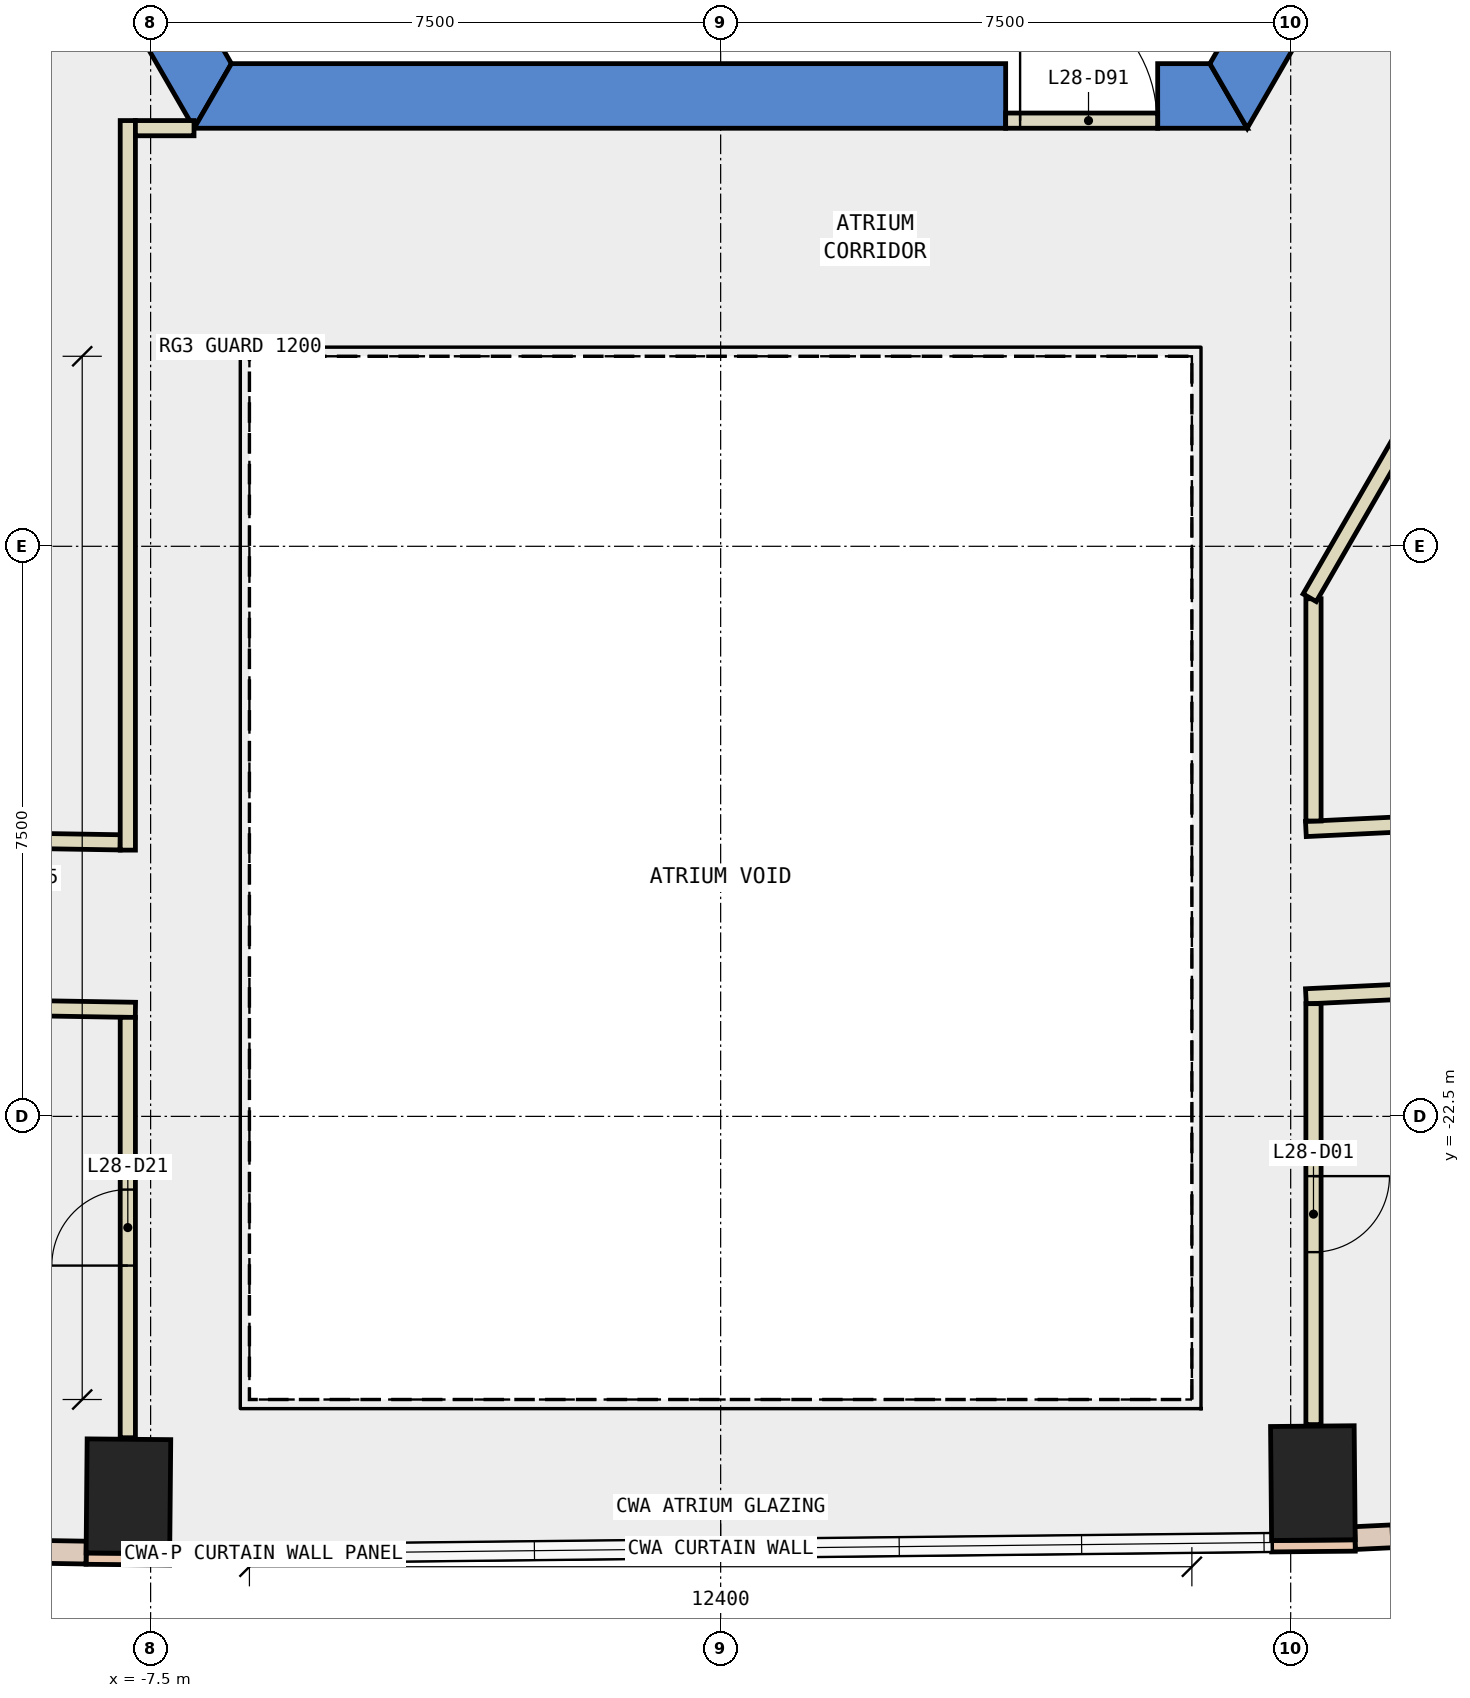
"""IFC4 building model, lengths in metres.
Left out: names, types, materials, properties, quantities, classifications, styles, units other than length and angle.
Written with IfcOpenShell. Run it as: python <this file> out.ifc"""

import sys

from ifc_helpers import new_model, si_unit, direction, frame, frame_2d, origin, origin_2d, place, context, subcontext, project, spatial, polyline, rectangle, outline, extrude, element, fill, save


model = new_model("IFC4")
c1 = context("Model", 3, precision=1e-05, world=origin(), true_north=direction((0.0, 1.0)))
c2 = subcontext(c1, "Body", "Model", "MODEL_VIEW")
j1 = project(units=[si_unit("LENGTHUNIT", "METRE"), si_unit("PLANEANGLEUNIT", "RADIAN")], contexts=[c1])
p1 = place(None, origin())
s1 = spatial("IfcSite", under=j1, at=p1, CompositionType="ELEMENT")
p2 = place(p1, origin())
s2 = spatial("IfcBuilding", under=s1, at=p2, CompositionType="ELEMENT")
p3 = place(p2, frame((0.0, 0.0, 128.6)))
s3 = spatial("IfcBuildingStorey", under=s2, at=p3, CompositionType="ELEMENT", Elevation=128.6)
for number, where, z_axis, x_axis in (
    (1, (-7.792, -27.498, -0.4), (0.0, 0.0, 1.0), (-1.0, 0.009, 0.0)),
    (2, (7.792, -27.325, -0.4), (0.0, 0.0, 1.0), (1.0, 0.009, 0.0)),
):
    element("IfcColumn", number, at=place(p3, frame(where, z_axis=z_axis, x_axis=x_axis)), inside=s3, PredefinedType="COLUMN", context=c2, shape_type="SweptSolid", body=[
        extrude(rectangle(XDim=1.1, YDim=1.5, at=origin_2d()), origin(), (0.0, 0.0, 1.0), 4.0),
    ])
p4 = place(p3, frame((0.0, 0.0, -0.4)))
e3 = element("IfcWall", 3, at=p4, inside=s3, PredefinedType="SHEAR", context=c2, shape_type="SweptSolid", body=[
    extrude(outline(polyline([(-13.856, 2.5), (-6.928, -9.5), (-6.437, -8.65), (-12.875, 2.5), (-13.856, 2.5)])), origin(), (0.0, 0.0, 1.0), 4.0),
])
p5 = place(p3, frame((0.0, 0.0, -0.4)))
e4 = element("IfcWall", 4, at=p5, inside=s3, PredefinedType="SHEAR", context=c2, shape_type="SweptSolid", body=[
    extrude(outline(polyline([(3.75, -9.5), (3.75, -8.65), (-6.437, -8.65), (-6.928, -9.5), (3.75, -9.5)])), origin(), (0.0, 0.0, 1.0), 4.0),
])
p6 = place(p3, frame((0.0, 0.0, -0.4)))
e5 = element("IfcWall", 5, at=p6, inside=s3, PredefinedType="SHEAR", context=c2, shape_type="SweptSolid", body=[
    extrude(outline(polyline([(5.75, -8.65), (5.75, -9.5), (6.928, -9.5), (6.437, -8.65), (5.75, -8.65)])), origin(), (0.0, 0.0, 1.0), 4.0),
])
p7 = place(p3, frame((0.0, 0.0, -0.4)))
e6 = element("IfcWall", 6, at=p7, inside=s3, PredefinedType="SHEAR", context=c2, shape_type="SweptSolid", body=[
    extrude(outline(polyline([(8.117, -7.44), (7.381, -7.015), (6.437, -8.65), (6.928, -9.5), (8.117, -7.44)])), origin(), (0.0, 0.0, 1.0), 4.0),
])
for number, where, z_axis, x_axis in (
    (7, (-8.349, -28.318, 0.0), (0.0, 0.0, 1.0), (1.0, -0.009, 0.0)),
    (8, (7.249, -28.155, 0.0), (0.0, 0.0, 1.0), (1.0, 0.009, 0.0)),
):
    element("IfcWall", number, at=place(p3, frame(where, z_axis=z_axis, x_axis=x_axis)), inside=s3, PredefinedType="STANDARD", context=c2, shape_type="SweptSolid", body=[
        extrude(rectangle(XDim=1.1, YDim=0.15, at=frame_2d((0.55, 0.0))), origin(), (0.0, 0.0, 1.0), 3.6),
    ])
p8 = place(p3, frame((-14.242, -28.141, 0.0), z_axis=(0.0, 0.0, 1.0), x_axis=(0.999862081538, -0.016607766328, 0.0)))
e9 = element("IfcWall", 9, at=p8, inside=s3, PredefinedType="STANDARD", context=c2, shape_type="SweptSolid", body=[
    extrude(rectangle(XDim=5.895, YDim=0.3, at=frame_2d((2.947, 0.0))), origin(), (0.0, 0.0, 1.0), 3.6),
])
p9 = place(p8, frame((0.474, 0.0, 0.9)))
e10 = element("IfcOpeningElement", 10, at=p9, cuts=e9, PredefinedType="OPENING", context=c2, shape_type="SweptSolid", body=[
    extrude(rectangle(XDim=2.0, YDim=2.6, at=frame_2d((1.0, 1.3))), frame((0.0, 0.16, 0.0), z_axis=(0.0, -1.0, 0.0), x_axis=(1.0, 0.0, 0.0)), (0.0, 0.0, 1.0), 0.32),
])
p10 = place(p8, frame((3.421, 0.0, 0.9)))
e11 = element("IfcOpeningElement", 11, at=p10, cuts=e9, PredefinedType="OPENING", context=c2, shape_type="SweptSolid", body=[
    extrude(rectangle(XDim=2.0, YDim=2.6, at=frame_2d((1.0, 1.3))), frame((0.0, 0.16, 0.0), z_axis=(0.0, -1.0, 0.0), x_axis=(1.0, 0.0, 0.0)), (0.0, 0.0, 1.0), 0.32),
])
p11 = place(p3, frame((8.347, -28.048, 0.0), z_axis=(0.0, 0.0, 1.0), x_axis=(0.998840459798, 0.048142869367, 0.0)))
e12 = element("IfcWall", 12, at=p11, inside=s3, PredefinedType="STANDARD", context=c2, shape_type="SweptSolid", body=[
    extrude(rectangle(XDim=5.903, YDim=0.3, at=frame_2d((2.951, 0.0))), origin(), (0.0, 0.0, 1.0), 3.6),
])
p12 = place(p11, frame((0.476, 0.0, 0.9)))
e13 = element("IfcOpeningElement", 13, at=p12, cuts=e12, PredefinedType="OPENING", context=c2, shape_type="SweptSolid", body=[
    extrude(rectangle(XDim=2.0, YDim=2.6, at=frame_2d((1.0, 1.3))), frame((0.0, 0.16, 0.0), z_axis=(0.0, -1.0, 0.0), x_axis=(1.0, 0.0, 0.0)), (0.0, 0.0, 1.0), 0.32),
])
p13 = place(p11, frame((3.427, 0.0, 0.9)))
e14 = element("IfcOpeningElement", 14, at=p13, cuts=e12, PredefinedType="OPENING", context=c2, shape_type="SweptSolid", body=[
    extrude(rectangle(XDim=2.0, YDim=2.6, at=frame_2d((1.0, 1.3))), frame((0.0, 0.16, 0.0), z_axis=(0.0, -1.0, 0.0), x_axis=(1.0, 0.0, 0.0)), (0.0, 0.0, 1.0), 0.32),
])
p14 = place(p3, frame((7.7, -18.719, 0.0), z_axis=(0.0, 0.0, 1.0), x_axis=(0.998829118209, 0.048377604502, 0.0)))
e15 = element("IfcWall", 15, at=p14, inside=s3, PredefinedType="PARTITIONING", context=c2, shape_type="SweptSolid", body=[
    extrude(rectangle(XDim=6.596, YDim=0.2, at=frame_2d((3.298, 0.0))), origin(), (0.0, 0.0, 1.0), 3.6),
])
p15 = place(p3, frame((-14.589, -18.784, 0.0), z_axis=(0.0, 0.0, 1.0), x_axis=(0.999862141497, -0.016604156151, 0.0)))
e16 = element("IfcWall", 16, at=p15, inside=s3, PredefinedType="PARTITIONING", context=c2, shape_type="SweptSolid", body=[
    extrude(rectangle(XDim=6.69, YDim=0.2, at=frame_2d((3.345, 0.0))), origin(), (0.0, 0.0, 1.0), 3.6),
])
p16 = place(p3, frame((14.481, -20.594, 0.0), z_axis=(0.0, 0.0, 1.0), x_axis=(-0.998839976403, -0.048152897512, 0.0)))
e17 = element("IfcWall", 17, at=p16, inside=s3, PredefinedType="PARTITIONING", context=c2, shape_type="SweptSolid", body=[
    extrude(rectangle(XDim=6.789, YDim=0.2, at=frame_2d((3.395, 0.0))), origin(), (0.0, 0.0, 1.0), 3.6),
])
p17 = place(p3, frame((-7.7, -21.099, 0.0), z_axis=(0.0, 0.0, 1.0), x_axis=(-0.999861998162, 0.016612785183, 0.0)))
e18 = element("IfcWall", 18, at=p17, inside=s3, PredefinedType="PARTITIONING", context=c2, shape_type="SweptSolid", body=[
    extrude(rectangle(XDim=6.863, YDim=0.2, at=frame_2d((3.432, 0.0))), origin(), (0.0, 0.0, 1.0), 3.6),
])
p18 = place(p3, frame((7.8, -15.69, 0.0), z_axis=(0.0, 0.0, 1.0), x_axis=(0.0, -1.0, 0.0)))
e19 = element("IfcWall", 19, at=p18, inside=s3, PredefinedType="PARTITIONING", context=c2, shape_type="SweptSolid", body=[
    extrude(rectangle(XDim=2.924, YDim=0.2, at=frame_2d((1.462, 0.0))), origin(), (0.0, 0.0, 1.0), 3.6),
])
p19 = place(p3, frame((-7.8, -18.997, 0.0), z_axis=(0.0, 0.0, 1.0), x_axis=(0.0, 1.0, 0.0)))
e20 = element("IfcWall", 20, at=p19, inside=s3, PredefinedType="PARTITIONING", context=c2, shape_type="SweptSolid", body=[
    extrude(rectangle(XDim=9.598, YDim=0.2, at=frame_2d((4.799, 0.0))), origin(), (0.0, 0.0, 1.0), 3.6),
])
p20 = place(p3, frame((-7.7, -9.499, 0.0), z_axis=(0.0, 0.0, 1.0), x_axis=(1.0, 0.0, 0.0)))
e21 = element("IfcWall", 21, at=p20, inside=s3, PredefinedType="PARTITIONING", context=c2, shape_type="SweptSolid", body=[
    extrude(rectangle(XDim=0.771, YDim=0.2, at=frame_2d((0.385, 0.0))), origin(), (0.0, 0.0, 1.0), 3.6),
])
p21 = place(p3, frame((7.8, -21.017, 0.0), z_axis=(0.0, 0.0, 1.0), x_axis=(0.0, -1.0, 0.0)))
e22 = element("IfcWall", 22, at=p21, inside=s3, PredefinedType="PARTITIONING", context=c2, shape_type="SweptSolid", body=[
    extrude(rectangle(XDim=5.538, YDim=0.2, at=frame_2d((2.769, 0.0))), origin(), (0.0, 0.0, 1.0), 3.6),
])
p22 = place(p21, frame((2.269, 0.0, 0.0)))
e23 = element("IfcOpeningElement", 23, at=p22, cuts=e22, PredefinedType="OPENING", context=c2, shape_type="SweptSolid", body=[
    extrude(rectangle(XDim=1.0, YDim=2.1, at=frame_2d((0.5, 1.05))), frame((0.0, 0.11, 0.0), z_axis=(0.0, -1.0, 0.0), x_axis=(1.0, 0.0, 0.0)), (0.0, 0.0, 1.0), 0.22),
])
p23 = place(p3, frame((-7.8, -26.728, 0.0), z_axis=(0.0, 0.0, 1.0), x_axis=(0.0, 1.0, 0.0)))
e24 = element("IfcWall", 24, at=p23, inside=s3, PredefinedType="PARTITIONING", context=c2, shape_type="SweptSolid", body=[
    extrude(rectangle(XDim=5.531, YDim=0.2, at=frame_2d((2.766, 0.0))), origin(), (0.0, 0.0, 1.0), 3.6),
])
p24 = place(p23, frame((2.265, 0.0, 0.0)))
e25 = element("IfcOpeningElement", 25, at=p24, cuts=e24, PredefinedType="OPENING", context=c2, shape_type="SweptSolid", body=[
    extrude(rectangle(XDim=1.0, YDim=2.1, at=frame_2d((0.5, 1.05))), frame((0.0, 0.11, 0.0), z_axis=(0.0, -1.0, 0.0), x_axis=(1.0, 0.0, 0.0)), (0.0, 0.0, 1.0), 0.22),
])
p25 = place(p3, frame((3.75, -9.4, 0.0), z_axis=(0.0, 0.0, 1.0), x_axis=(1.0, 0.0, 0.0)))
e26 = element("IfcWall", 26, at=p25, inside=s3, PredefinedType="PARTITIONING", context=c2, shape_type="SweptSolid", body=[
    extrude(rectangle(XDim=2.0, YDim=0.2, at=frame_2d((1.0, 0.0))), origin(), (0.0, 0.0, 1.0), 2.4),
])
p26 = place(p25, frame((0.19, 0.0, 0.0)))
e27 = element("IfcOpeningElement", 27, at=p26, cuts=e26, PredefinedType="OPENING", context=c2, shape_type="SweptSolid", body=[
    extrude(rectangle(XDim=1.8, YDim=2.1, at=frame_2d((0.9, 1.05))), frame((0.0, 0.11, 0.0), z_axis=(0.0, -1.0, 0.0), x_axis=(1.0, 0.0, 0.0)), (0.0, 0.0, 1.0), 0.22),
])
p27 = place(p3, frame((12.401, -7.621, 0.0), z_axis=(0.0, 0.0, 1.0), x_axis=(-0.499983724212, -0.866034800411, 0.0)))
e28 = element("IfcWall", 28, at=p27, inside=s3, PredefinedType="PARTITIONING", context=c2, shape_type="SweptSolid", body=[
    extrude(rectangle(XDim=9.302, YDim=0.2, at=frame_2d((4.651, 0.0))), origin(), (0.0, 0.0, 1.0), 3.6),
])
p28 = place(p27, frame((0.231, 0.0, 0.0)))
e29 = element("IfcOpeningElement", 29, at=p28, cuts=e28, PredefinedType="OPENING", context=c2, shape_type="SweptSolid", body=[
    extrude(rectangle(XDim=1.0, YDim=2.1, at=frame_2d((0.5, 1.05))), frame((0.0, 0.11, 0.0), z_axis=(0.0, -1.0, 0.0), x_axis=(1.0, 0.0, 0.0)), (0.0, 0.0, 1.0), 0.22),
])
p29 = place(p27, frame((1.331, 0.0, 0.0)))
e30 = element("IfcOpeningElement", 30, at=p29, cuts=e28, PredefinedType="OPENING", context=c2, shape_type="SweptSolid", body=[
    extrude(rectangle(XDim=1.0, YDim=2.1, at=frame_2d((0.5, 1.05))), frame((0.0, 0.11, 0.0), z_axis=(0.0, -1.0, 0.0), x_axis=(1.0, 0.0, 0.0)), (0.0, 0.0, 1.0), 0.22),
])
p30 = place(p22, origin())
e31 = element("IfcDoor", 31, at=p30, inside=s3, OperationType="SINGLE_SWING_LEFT", PredefinedType="DOOR", context=c2, shape_type="SweptSolid", body=[
    extrude(rectangle(XDim=1.0, YDim=2.1, at=frame_2d((0.5, 1.05))), frame((0.0, 0.025, 0.0), z_axis=(0.0, -1.0, 0.0), x_axis=(1.0, 0.0, 0.0)), (0.0, 0.0, 1.0), 0.05),
])
fill(e23, e31)
p31 = place(p24, origin())
e32 = element("IfcDoor", 32, at=p31, inside=s3, OperationType="SINGLE_SWING_LEFT", PredefinedType="DOOR", context=c2, shape_type="SweptSolid", body=[
    extrude(rectangle(XDim=1.0, YDim=2.1, at=frame_2d((0.5, 1.05))), frame((0.0, 0.025, 0.0), z_axis=(0.0, -1.0, 0.0), x_axis=(1.0, 0.0, 0.0)), (0.0, 0.0, 1.0), 0.05),
])
fill(e25, e32)
p32 = place(p26, origin())
e33 = element("IfcDoor", 33, at=p32, inside=s3, OperationType="DOUBLE_DOOR_SINGLE_SWING", PredefinedType="DOOR", context=c2, shape_type="SweptSolid", body=[
    extrude(rectangle(XDim=1.8, YDim=2.1, at=frame_2d((0.9, 1.05))), frame((0.0, 0.025, 0.0), z_axis=(0.0, -1.0, 0.0), x_axis=(1.0, 0.0, 0.0)), (0.0, 0.0, 1.0), 0.05),
])
fill(e27, e33)
save(model, sys.argv[1])
